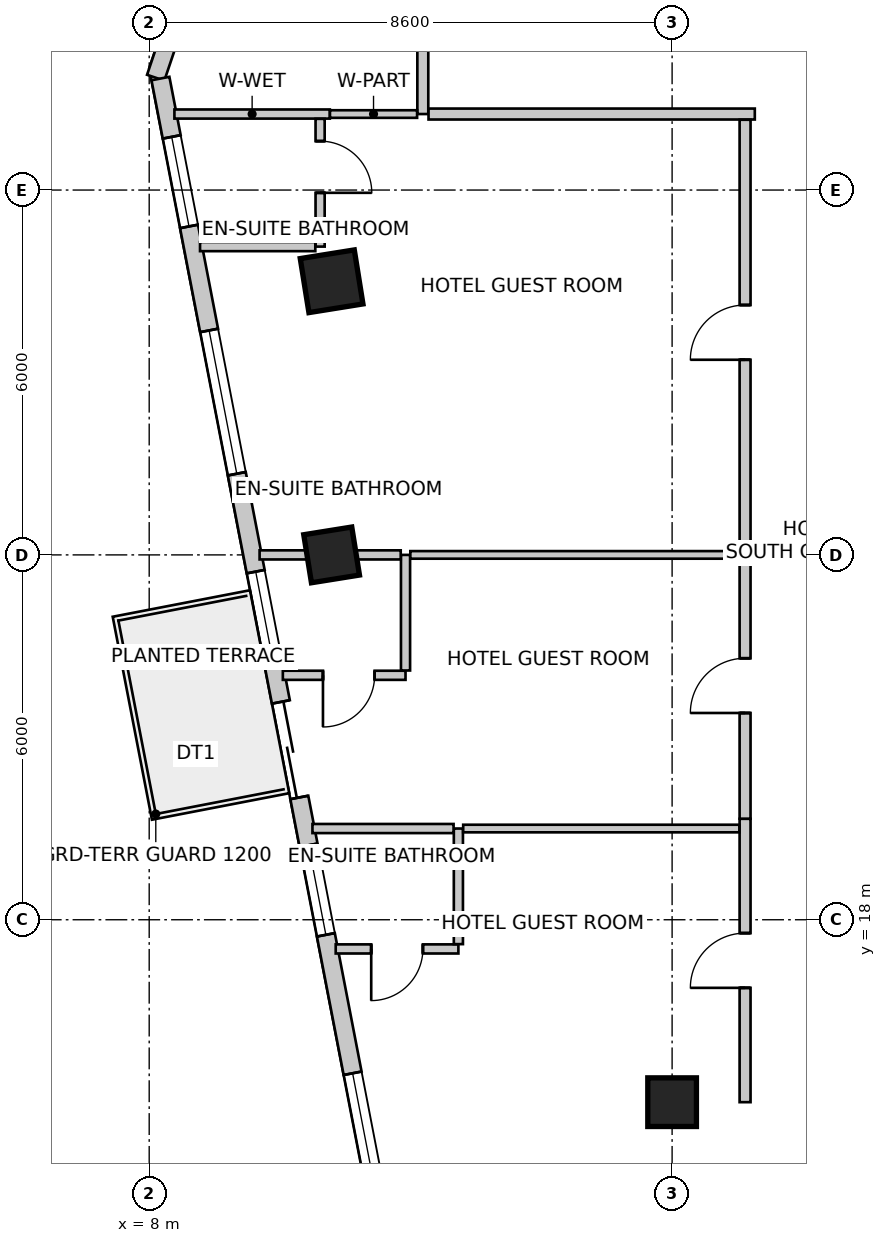
"""IFC4 building model, lengths in metres.
Left out: names, types, materials, properties, quantities, classifications, styles, units other than length and angle.
Written with IfcOpenShell. Run it as: python <this file> out.ifc"""

import sys

from ifc_helpers import new_model, si_unit, direction, frame, frame_2d, origin, origin_2d, place, context, subcontext, project, spatial, rectangle, extrude, source, transform, mapped, element, fill, save


model = new_model("IFC4")
c1 = context("Model", 3, precision=1e-05, world=origin(), true_north=direction((0.0, 1.0)))
c2 = subcontext(c1, "Body", "Model", "MODEL_VIEW")
j1 = project(units=[si_unit("LENGTHUNIT", "METRE"), si_unit("PLANEANGLEUNIT", "RADIAN")], contexts=[c1])
p1 = place(None, origin())
s1 = spatial("IfcSite", under=j1, at=p1, CompositionType="ELEMENT")
p2 = place(p1, origin())
s2 = spatial("IfcBuilding", under=s1, at=p2, CompositionType="ELEMENT")
p3 = place(p2, frame((0.0, 0.0, 121.4)))
s3 = spatial("IfcBuildingStorey", under=s2, at=p3, CompositionType="ELEMENT", Elevation=121.4)
m1 = source(origin(), c2, "Body", "SweptSolid", [
    extrude(rectangle(XDim=0.9, YDim=0.9, at=origin_2d()), origin(), (0.0, 0.0, 1.0), 3.6),
])
p4 = place(p3, frame((11.0, 28.5, 0.0), z_axis=(0.0, 0.0, 1.0), x_axis=(0.158158067254, -0.987413806751, 0.0)))
e1 = element("IfcColumn", 1, at=p4, inside=s3, PredefinedType="COLUMN", context=c2, shape_type="MappedRepresentation", body=[
    mapped(m1, transform((0.0, 0.0, 0.0), scale=1.0)),
])
m2 = source(origin(), c2, "Body", "SweptSolid", [
    extrude(rectangle(XDim=0.8, YDim=0.8, at=origin_2d()), origin(), (0.0, 0.0, 1.0), 3.6),
])
for number, where, z_axis, x_axis in (
    (2, (11.0, 24.0, 0.0), (0.0, 0.0, 1.0), (0.158, -0.987, 0.0)),
    (3, (16.6, 15.0, 0.0), (0.0, 0.0, 1.0), (1.0, 0.0, 0.0)),
):
    element("IfcColumn", number, at=place(p3, frame(where, z_axis=z_axis, x_axis=x_axis)), inside=s3, PredefinedType="COLUMN", context=c2, shape_type="MappedRepresentation", body=[
        mapped(m2, transform((0.0, 0.0, 0.0), scale=1.0)),
    ])
p5 = place(p3, frame((13.269, 47.134, 0.0), z_axis=(0.0, 0.0, 1.0), x_axis=(-0.319929596295, -0.947441319246, 0.0)))
e4 = element("IfcWall", 4, at=p5, inside=s3, PredefinedType="SOLIDWALL", context=c2, shape_type="SweptSolid", body=[
    extrude(rectangle(XDim=16.134, YDim=0.3, at=frame_2d((8.067, 0.0))), origin(), (0.0, 0.0, 1.0), 3.35),
])
m3 = source(origin(), c2, "Body", "SweptSolid", [
    extrude(rectangle(XDim=2.1, YDim=2.0, at=frame_2d((1.05, 1.0))), frame((0.0, 0.16, 0.0), z_axis=(0.0, -1.0, 0.0), x_axis=(1.0, 0.0, 0.0)), (0.0, 0.0, 1.0), 0.32),
])
p6 = place(p5, frame((2.426, 0.0, 0.85)))
e5 = element("IfcOpeningElement", 5, at=p6, cuts=e4, PredefinedType="OPENING", context=c2, shape_type="MappedRepresentation", body=[
    mapped(m3, transform((0.0, 0.0, 0.0), scale=1.0)),
])
m4 = source(origin(), c2, "Body", "SweptSolid", [
    extrude(rectangle(XDim=2.4, YDim=2.2, at=frame_2d((1.2, 1.1))), frame((0.0, 0.16, 0.0), z_axis=(0.0, -1.0, 0.0), x_axis=(1.0, 0.0, 0.0)), (0.0, 0.0, 1.0), 0.32),
])
p7 = place(p5, frame((7.211, 0.0, 0.85)))
e6 = element("IfcOpeningElement", 6, at=p7, cuts=e4, PredefinedType="OPENING", context=c2, shape_type="MappedRepresentation", body=[
    mapped(m4, transform((0.0, 0.0, 0.0), scale=1.0)),
])
p8 = place(p5, frame((12.297, 0.0, 0.85)))
e7 = element("IfcOpeningElement", 7, at=p8, cuts=e4, PredefinedType="OPENING", context=c2, shape_type="MappedRepresentation", body=[
    mapped(m3, transform((0.0, 0.0, 0.0), scale=1.0)),
])
p9 = place(p3, frame((8.185, 31.834, 0.0), z_axis=(0.0, 0.0, 1.0), x_axis=(0.189707113148, -0.981840725994, 0.0)))
e8 = element("IfcWall", 8, at=p9, inside=s3, PredefinedType="SOLIDWALL", context=c2, shape_type="SweptSolid", body=[
    extrude(rectangle(XDim=21.221, YDim=0.3, at=frame_2d((10.611, 0.0))), origin(), (0.0, 0.0, 1.0), 3.35),
])
m5 = source(origin(), c2, "Body", "SweptSolid", [
    extrude(rectangle(XDim=1.6, YDim=2.15, at=frame_2d((0.8, 1.075))), frame((0.0, 0.16, 0.0), z_axis=(0.0, -1.0, 0.0), x_axis=(1.0, 0.0, 0.0)), (0.0, 0.0, 1.0), 0.32),
])
p10 = place(p9, frame((10.441, 0.0, 0.0)))
e9 = element("IfcOpeningElement", 9, at=p10, cuts=e8, PredefinedType="OPENING", context=c2, shape_type="MappedRepresentation", body=[
    mapped(m5, transform((0.0, 0.0, 0.0), scale=1.0)),
])
m6 = source(origin(), c2, "Body", "SweptSolid", [
    extrude(rectangle(XDim=1.5, YDim=1.8, at=frame_2d((0.75, 0.9))), frame((0.0, 0.16, 0.0), z_axis=(0.0, -1.0, 0.0), x_axis=(1.0, 0.0, 0.0)), (0.0, 0.0, 1.0), 0.32),
])
p11 = place(p9, frame((0.977, 0.0, 0.85)))
e10 = element("IfcOpeningElement", 10, at=p11, cuts=e8, PredefinedType="OPENING", context=c2, shape_type="MappedRepresentation", body=[
    mapped(m6, transform((0.0, 0.0, 0.0), scale=1.0)),
])
p12 = place(p9, frame((4.219, 0.0, 0.85)))
e11 = element("IfcOpeningElement", 11, at=p12, cuts=e8, PredefinedType="OPENING", context=c2, shape_type="MappedRepresentation", body=[
    mapped(m4, transform((0.0, 0.0, 0.0), scale=1.0)),
])
p13 = place(p9, frame((8.259, 0.0, 0.85)))
e12 = element("IfcOpeningElement", 12, at=p13, cuts=e8, PredefinedType="OPENING", context=c2, shape_type="MappedRepresentation", body=[
    mapped(m6, transform((0.0, 0.0, 0.0), scale=1.0)),
])
p14 = place(p9, frame((12.842, 0.0, 0.85)))
e13 = element("IfcOpeningElement", 13, at=p14, cuts=e8, PredefinedType="OPENING", context=c2, shape_type="MappedRepresentation", body=[
    mapped(m6, transform((0.0, 0.0, 0.0), scale=1.0)),
])
p15 = place(p9, frame((16.661, 0.0, 0.85)))
e14 = element("IfcOpeningElement", 14, at=p15, cuts=e8, PredefinedType="OPENING", context=c2, shape_type="MappedRepresentation", body=[
    mapped(m4, transform((0.0, 0.0, 0.0), scale=1.0)),
])
p16 = place(p3, frame((12.5, 31.25, 0.0), z_axis=(0.0, 0.0, 1.0), x_axis=(0.0, 1.0, 0.0)))
e15 = element("IfcWall", 15, at=p16, inside=s3, PredefinedType="PARTITIONING", context=c2, shape_type="SweptSolid", body=[
    extrude(rectangle(XDim=2.2, YDim=0.18, at=frame_2d((1.1, 0.0))), origin(), (0.0, 0.0, 1.0), 3.034),
])
p17 = place(p3, frame((17.96, 31.25, 0.0), z_axis=(0.0, 0.0, 1.0), x_axis=(-1.0, 0.0, 0.0)))
e16 = element("IfcWall", 16, at=p17, inside=s3, PredefinedType="PARTITIONING", context=c2, shape_type="SweptSolid", body=[
    extrude(rectangle(XDim=5.366, YDim=0.18, at=frame_2d((2.683, 0.0))), origin(), (0.0, 0.0, 1.0), 3.034),
])
p18 = place(p3, frame((10.971, 31.25, 0.0), z_axis=(0.0, 0.0, 1.0), x_axis=(-1.0, 0.0, 0.0)))
e17 = element("IfcWall", 17, at=p18, inside=s3, PredefinedType="PARTITIONING", context=c2, shape_type="SweptSolid", body=[
    extrude(rectangle(XDim=2.556, YDim=0.15, at=frame_2d((1.278, 0.0))), origin(), (0.0, 0.0, 1.0), 2.492),
])
p19 = place(p3, frame((12.406, 31.25, 0.0), z_axis=(0.0, 0.0, 1.0), x_axis=(-1.0, 0.0, 0.0)))
e18 = element("IfcWall", 18, at=p19, inside=s3, PredefinedType="PARTITIONING", context=c2, shape_type="SweptSolid", body=[
    extrude(rectangle(XDim=1.433, YDim=0.125, at=frame_2d((0.717, 0.0))), origin(), (0.0, 0.0, 1.0), 2.492),
])
p20 = place(p3, frame((17.8, 15.0, 0.0), z_axis=(0.0, 0.0, 1.0), x_axis=(0.0, 1.0, 0.0)))
e19 = element("IfcWall", 19, at=p20, inside=s3, PredefinedType="PARTITIONING", context=c2, shape_type="SweptSolid", body=[
    extrude(rectangle(XDim=4.66, YDim=0.18, at=frame_2d((2.33, 0.0))), origin(), (0.0, 0.0, 1.0), 2.492),
])
m7 = source(origin(), c2, "Body", "SweptSolid", [
    extrude(rectangle(XDim=0.9, YDim=2.15, at=frame_2d((0.45, 1.075))), frame((0.0, 0.1, 0.0), z_axis=(0.0, -1.0, 0.0), x_axis=(1.0, 0.0, 0.0)), (0.0, 0.0, 1.0), 0.2),
])
p21 = place(p20, frame((1.88, 0.0, 0.0)))
e20 = element("IfcOpeningElement", 20, at=p21, cuts=e19, PredefinedType="OPENING", context=c2, shape_type="MappedRepresentation", body=[
    mapped(m7, transform((0.0, 0.0, 0.0), scale=1.0)),
])
p22 = place(p3, frame((17.8, 19.662, 0.0), z_axis=(0.0, 0.0, 1.0), x_axis=(0.0, 1.0, 0.0)))
e21 = element("IfcWall", 21, at=p22, inside=s3, PredefinedType="PARTITIONING", context=c2, shape_type="SweptSolid", body=[
    extrude(rectangle(XDim=4.498, YDim=0.18, at=frame_2d((2.249, 0.0))), origin(), (0.0, 0.0, 1.0), 2.803),
])
p23 = place(p22, frame((1.738, 0.0, 0.0)))
e22 = element("IfcOpeningElement", 22, at=p23, cuts=e21, PredefinedType="OPENING", context=c2, shape_type="MappedRepresentation", body=[
    mapped(m7, transform((0.0, 0.0, 0.0), scale=1.0)),
])
p24 = place(p3, frame((17.8, 24.162, 0.0), z_axis=(0.0, 0.0, 1.0), x_axis=(0.0, 1.0, 0.0)))
e23 = element("IfcWall", 23, at=p24, inside=s3, PredefinedType="PARTITIONING", context=c2, shape_type="SweptSolid", body=[
    extrude(rectangle(XDim=6.994, YDim=0.18, at=frame_2d((3.497, 0.0))), origin(), (0.0, 0.0, 1.0), 2.803),
])
p25 = place(p24, frame((3.047, 0.0, 0.0)))
e24 = element("IfcOpeningElement", 24, at=p25, cuts=e23, PredefinedType="OPENING", context=c2, shape_type="MappedRepresentation", body=[
    mapped(m7, transform((0.0, 0.0, 0.0), scale=1.0)),
])
p26 = place(p3, frame((13.085, 17.52, 0.0), z_axis=(0.0, 0.0, 1.0), x_axis=(-1.0, 0.0, 0.0)))
e25 = element("IfcWall", 25, at=p26, inside=s3, PredefinedType="PARTITIONING", context=c2, shape_type="SweptSolid", body=[
    extrude(rectangle(XDim=2.018, YDim=0.15, at=frame_2d((1.009, 0.0))), origin(), (0.0, 0.0, 1.0), 3.35),
])
m8 = source(origin(), c2, "Body", "SweptSolid", [
    extrude(rectangle(XDim=0.85, YDim=2.15, at=frame_2d((0.425, 1.075))), frame((0.0, 0.085, 0.0), z_axis=(0.0, -1.0, 0.0), x_axis=(1.0, 0.0, 0.0)), (0.0, 0.0, 1.0), 0.17),
])
p27 = place(p26, frame((0.584, 0.0, 0.0)))
e26 = element("IfcOpeningElement", 26, at=p27, cuts=e25, PredefinedType="OPENING", context=c2, shape_type="MappedRepresentation", body=[
    mapped(m8, transform((0.0, 0.0, 0.0), scale=1.0)),
])
p28 = place(p3, frame((13.085, 19.5, 0.0), z_axis=(0.0, 0.0, 1.0), x_axis=(0.0, -1.0, 0.0)))
e27 = element("IfcWall", 27, at=p28, inside=s3, PredefinedType="PARTITIONING", context=c2, shape_type="SweptSolid", body=[
    extrude(rectangle(XDim=1.901, YDim=0.15, at=frame_2d((0.95, 0.0))), origin(), (0.0, 0.0, 1.0), 3.35),
])
p29 = place(p3, frame((10.685, 19.5, 0.0), z_axis=(0.0, 0.0, 1.0), x_axis=(1.0, 0.0, 0.0)))
e28 = element("IfcWall", 28, at=p29, inside=s3, PredefinedType="PARTITIONING", context=c2, shape_type="SweptSolid", body=[
    extrude(rectangle(XDim=2.321, YDim=0.15, at=frame_2d((1.161, 0.0))), origin(), (0.0, 0.0, 1.0), 3.35),
])
p30 = place(p3, frame((13.164, 19.5, 0.0), z_axis=(0.0, 0.0, 1.0), x_axis=(1.0, 0.0, 0.0)))
e29 = element("IfcWall", 29, at=p30, inside=s3, PredefinedType="PARTITIONING", context=c2, shape_type="SweptSolid", body=[
    extrude(rectangle(XDim=4.542, YDim=0.125, at=frame_2d((2.271, 0.0))), origin(), (0.0, 0.0, 1.0), 3.35),
])
p31 = place(p3, frame((12.216, 22.02, 0.0), z_axis=(0.0, 0.0, 1.0), x_axis=(-1.0, 0.0, 0.0)))
e30 = element("IfcWall", 30, at=p31, inside=s3, PredefinedType="PARTITIONING", context=c2, shape_type="SweptSolid", body=[
    extrude(rectangle(XDim=2.018, YDim=0.15, at=frame_2d((1.009, 0.0))), origin(), (0.0, 0.0, 1.0), 3.35),
])
p32 = place(p31, frame((0.508, 0.0, 0.0)))
e31 = element("IfcOpeningElement", 31, at=p32, cuts=e30, PredefinedType="OPENING", context=c2, shape_type="MappedRepresentation", body=[
    mapped(m8, transform((0.0, 0.0, 0.0), scale=1.0)),
])
p33 = place(p3, frame((12.216, 24.0, 0.0), z_axis=(0.0, 0.0, 1.0), x_axis=(0.0, -1.0, 0.0)))
e32 = element("IfcWall", 32, at=p33, inside=s3, PredefinedType="PARTITIONING", context=c2, shape_type="SweptSolid", body=[
    extrude(rectangle(XDim=1.901, YDim=0.15, at=frame_2d((0.95, 0.0))), origin(), (0.0, 0.0, 1.0), 2.803),
])
p34 = place(p3, frame((9.816, 24.0, 0.0), z_axis=(0.0, 0.0, 1.0), x_axis=(1.0, 0.0, 0.0)))
e33 = element("IfcWall", 33, at=p34, inside=s3, PredefinedType="PARTITIONING", context=c2, shape_type="SweptSolid", body=[
    extrude(rectangle(XDim=2.321, YDim=0.15, at=frame_2d((1.161, 0.0))), origin(), (0.0, 0.0, 1.0), 2.492),
])
p35 = place(p3, frame((12.295, 24.0, 0.0), z_axis=(0.0, 0.0, 1.0), x_axis=(1.0, 0.0, 0.0)))
e34 = element("IfcWall", 34, at=p35, inside=s3, PredefinedType="PARTITIONING", context=c2, shape_type="SweptSolid", body=[
    extrude(rectangle(XDim=5.411, YDim=0.125, at=frame_2d((2.706, 0.0))), origin(), (0.0, 0.0, 1.0), 2.803),
])
p36 = place(p3, frame((10.811, 31.171, 0.0), z_axis=(0.0, 0.0, 1.0), x_axis=(0.0, -1.0, 0.0)))
e35 = element("IfcWall", 35, at=p36, inside=s3, PredefinedType="PARTITIONING", context=c2, shape_type="SweptSolid", body=[
    extrude(rectangle(XDim=2.101, YDim=0.15, at=frame_2d((1.05, 0.0))), origin(), (0.0, 0.0, 1.0), 2.492),
])
p37 = place(p36, frame((0.366, 0.0, 0.0)))
e36 = element("IfcOpeningElement", 36, at=p37, cuts=e35, PredefinedType="OPENING", context=c2, shape_type="MappedRepresentation", body=[
    mapped(m8, transform((0.0, 0.0, 0.0), scale=1.0)),
])
p38 = place(p3, frame((10.732, 29.07, 0.0), z_axis=(0.0, 0.0, 1.0), x_axis=(-1.0, 0.0, 0.0)))
e37 = element("IfcWall", 37, at=p38, inside=s3, PredefinedType="PARTITIONING", context=c2, shape_type="SweptSolid", body=[
    extrude(rectangle(XDim=1.896, YDim=0.15, at=frame_2d((0.948, 0.0))), origin(), (0.0, 0.0, 1.0), 3.35),
])
m9 = source(origin(), c2, "Body", "SweptSolid", [
    extrude(rectangle(XDim=1.6, YDim=2.15, at=frame_2d((0.8, 1.075))), frame((0.0, 0.025, 0.0), z_axis=(0.0, -1.0, 0.0), x_axis=(1.0, 0.0, 0.0)), (0.0, 0.0, 1.0), 0.05),
])
p39 = place(p10, origin())
e38 = element("IfcDoor", 38, at=p39, inside=s3, OperationType="DOUBLE_DOOR_SLIDING", PredefinedType="DOOR", context=c2, shape_type="MappedRepresentation", body=[
    mapped(m9, transform((0.0, 0.0, 0.0), scale=1.0)),
])
fill(e9, e38)
m10 = source(origin(), c2, "Body", "SweptSolid", [
    extrude(rectangle(XDim=1.5, YDim=1.8, at=frame_2d((0.75, 0.9))), frame((0.0, -0.015, 0.0), z_axis=(0.0, -1.0, 0.0), x_axis=(1.0, 0.0, 0.0)), (0.0, 0.0, 1.0), 0.06),
])
p40 = place(p11, origin())
e39 = element("IfcWindow", 39, at=p40, inside=s3, PartitioningType="SINGLE_PANEL", PredefinedType="WINDOW", context=c2, shape_type="MappedRepresentation", body=[
    mapped(m10, transform((0.0, 0.0, 0.0), scale=1.0)),
])
fill(e10, e39)
m11 = source(origin(), c2, "Body", "SweptSolid", [
    extrude(rectangle(XDim=2.4, YDim=2.2, at=frame_2d((1.2, 1.1))), frame((0.0, -0.015, 0.0), z_axis=(0.0, -1.0, 0.0), x_axis=(1.0, 0.0, 0.0)), (0.0, 0.0, 1.0), 0.06),
])
p41 = place(p12, origin())
e40 = element("IfcWindow", 40, at=p41, inside=s3, PartitioningType="SINGLE_PANEL", PredefinedType="WINDOW", context=c2, shape_type="MappedRepresentation", body=[
    mapped(m11, transform((0.0, 0.0, 0.0), scale=1.0)),
])
fill(e11, e40)
p42 = place(p13, origin())
e41 = element("IfcWindow", 41, at=p42, inside=s3, PartitioningType="SINGLE_PANEL", PredefinedType="WINDOW", context=c2, shape_type="MappedRepresentation", body=[
    mapped(m10, transform((0.0, 0.0, 0.0), scale=1.0)),
])
fill(e12, e41)
p43 = place(p14, origin())
e42 = element("IfcWindow", 42, at=p43, inside=s3, PartitioningType="SINGLE_PANEL", PredefinedType="WINDOW", context=c2, shape_type="MappedRepresentation", body=[
    mapped(m10, transform((0.0, 0.0, 0.0), scale=1.0)),
])
fill(e13, e42)
p44 = place(p15, origin())
e43 = element("IfcWindow", 43, at=p44, inside=s3, PartitioningType="SINGLE_PANEL", PredefinedType="WINDOW", context=c2, shape_type="MappedRepresentation", body=[
    mapped(m11, transform((0.0, 0.0, 0.0), scale=1.0)),
])
fill(e14, e43)
m12 = source(origin(), c2, "Body", "SweptSolid", [
    extrude(rectangle(XDim=0.85, YDim=2.15, at=frame_2d((0.425, 1.075))), frame((0.0, 0.025, 0.0), z_axis=(0.0, -1.0, 0.0), x_axis=(1.0, 0.0, 0.0)), (0.0, 0.0, 1.0), 0.05),
])
p45 = place(p27, origin())
e44 = element("IfcDoor", 44, at=p45, inside=s3, OperationType="SINGLE_SWING_RIGHT", PredefinedType="DOOR", context=c2, shape_type="MappedRepresentation", body=[
    mapped(m12, transform((0.0, 0.0, 0.0), scale=1.0)),
])
fill(e26, e44)
m13 = source(origin(), c2, "Body", "SweptSolid", [
    extrude(rectangle(XDim=0.9, YDim=2.15, at=frame_2d((0.45, 1.075))), frame((0.0, 0.025, 0.0), z_axis=(0.0, -1.0, 0.0), x_axis=(1.0, 0.0, 0.0)), (0.0, 0.0, 1.0), 0.05),
])
p46 = place(p21, origin())
e45 = element("IfcDoor", 45, at=p46, inside=s3, OperationType="SINGLE_SWING_LEFT", PredefinedType="DOOR", context=c2, shape_type="MappedRepresentation", body=[
    mapped(m13, transform((0.0, 0.0, 0.0), scale=1.0)),
])
fill(e20, e45)
p47 = place(p32, origin())
e46 = element("IfcDoor", 46, at=p47, inside=s3, OperationType="SINGLE_SWING_RIGHT", PredefinedType="DOOR", context=c2, shape_type="MappedRepresentation", body=[
    mapped(m12, transform((0.0, 0.0, 0.0), scale=1.0)),
])
fill(e31, e46)
p48 = place(p23, origin())
e47 = element("IfcDoor", 47, at=p48, inside=s3, OperationType="SINGLE_SWING_LEFT", PredefinedType="DOOR", context=c2, shape_type="MappedRepresentation", body=[
    mapped(m13, transform((0.0, 0.0, 0.0), scale=1.0)),
])
fill(e22, e47)
p49 = place(p37, origin())
e48 = element("IfcDoor", 48, at=p49, inside=s3, OperationType="SINGLE_SWING_RIGHT", PredefinedType="DOOR", context=c2, shape_type="MappedRepresentation", body=[
    mapped(m12, transform((0.0, 0.0, 0.0), scale=1.0)),
])
fill(e36, e48)
p50 = place(p25, origin())
e49 = element("IfcDoor", 49, at=p50, inside=s3, OperationType="SINGLE_SWING_LEFT", PredefinedType="DOOR", context=c2, shape_type="MappedRepresentation", body=[
    mapped(m13, transform((0.0, 0.0, 0.0), scale=1.0)),
])
fill(e24, e49)
save(model, sys.argv[1])
